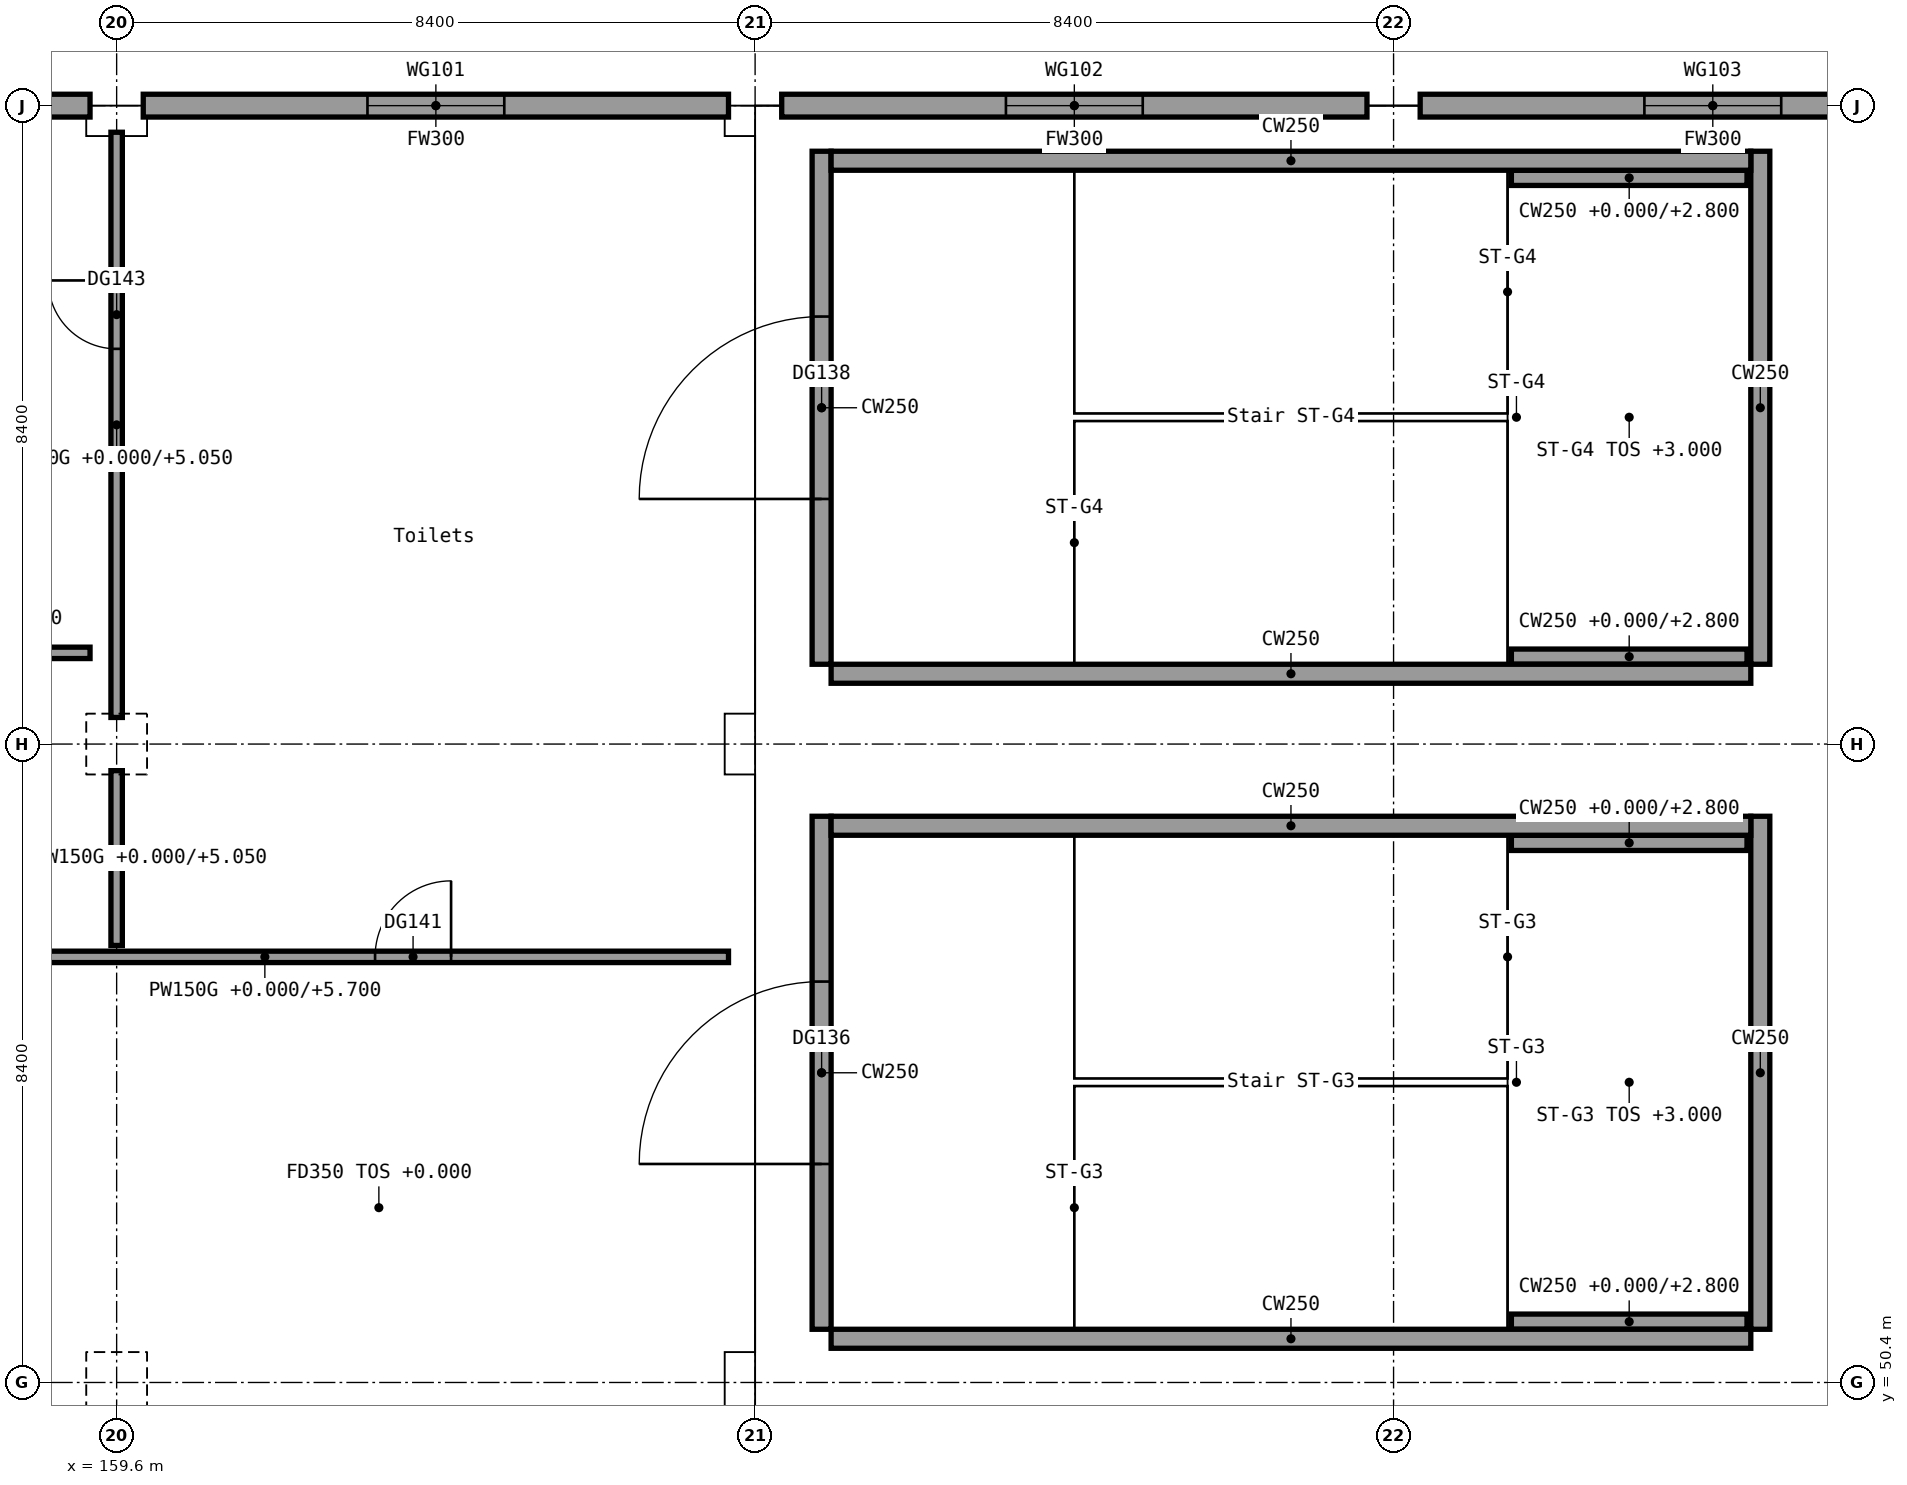
"""IFC4 building model, lengths in metres.
Left out: names, types, materials, properties, quantities, classifications, styles, units other than length and angle.
Written with IfcOpenShell. Run it as: python <this file> out.ifc"""

import sys

from ifc_helpers import new_model, si_unit, direction, frame, frame_2d, origin, origin_2d, place, context, subcontext, project, spatial, rectangle, extrude, element, fill, save


model = new_model("IFC4")
c1 = context("Model", 3, precision=1e-05, world=origin(), true_north=direction((0.0, 1.0)))
c2 = subcontext(c1, "Body", "Model", "MODEL_VIEW")
j1 = project(units=[si_unit("LENGTHUNIT", "METRE"), si_unit("PLANEANGLEUNIT", "RADIAN")], contexts=[c1])
p1 = place(None, origin())
s1 = spatial("IfcSite", under=j1, at=p1, CompositionType="ELEMENT")
p2 = place(p1, origin())
s2 = spatial("IfcBuilding", under=s1, at=p2, CompositionType="ELEMENT")
p3 = place(p2, origin())
s3 = spatial("IfcBuildingStorey", under=s2, at=p3, CompositionType="ELEMENT", Elevation=0.0)
p4 = place(p3, frame((193.886, 58.008, 0.0), z_axis=(0.0, 0.0, 1.0), x_axis=(-0.642781866374, -0.766049262293, 0.0)))
e1 = element("IfcWall", 1, at=p4, inside=s3, PredefinedType="SHEAR", context=c2, shape_type="SweptSolid", body=[
    extrude(rectangle(XDim=38.95, YDim=0.4, at=frame_2d((19.475, 0.0))), origin(), (0.0, 0.0, 1.0), 6.0),
])
p5 = place(p4, frame((13.7, 0.0, 0.0)))
e2 = element("IfcOpeningElement", 2, at=p5, cuts=e1, PredefinedType="OPENING", context=c2, shape_type="SweptSolid", body=[
    extrude(rectangle(XDim=2.4, YDim=2.4, at=frame_2d((1.2, 1.2))), frame((0.0, 0.2, 0.0), z_axis=(0.0, -1.0, 0.0), x_axis=(1.0, 0.0, 0.0)), (0.0, 0.0, 1.0), 0.4),
])
p6 = place(p4, frame((17.2, 0.0, 0.0)))
e3 = element("IfcOpeningElement", 3, at=p6, cuts=e1, PredefinedType="OPENING", context=c2, shape_type="SweptSolid", body=[
    extrude(rectangle(XDim=2.4, YDim=2.4, at=frame_2d((1.2, 1.2))), frame((0.0, 0.2, 0.0), z_axis=(0.0, -1.0, 0.0), x_axis=(1.0, 0.0, 0.0)), (0.0, 0.0, 1.0), 0.4),
])
p7 = place(p4, frame((34.9, 0.0, 0.0)))
e4 = element("IfcOpeningElement", 4, at=p7, cuts=e1, PredefinedType="OPENING", context=c2, shape_type="SweptSolid", body=[
    extrude(rectangle(XDim=1.8, YDim=2.4, at=frame_2d((0.9, 1.2))), frame((0.0, 0.2, 0.0), z_axis=(0.0, -1.0, 0.0), x_axis=(1.0, 0.0, 0.0)), (0.0, 0.0, 1.0), 0.4),
])
for number, where, z_axis, x_axis in (
    (5, (159.6, 50.4, 0.0), (0.0, 0.0, 1.0), (1.0, 0.0, 0.0)),
    (6, (159.6, 58.8, 0.0), (0.0, 0.0, 1.0), (1.0, 0.0, 0.0)),
    (7, (159.6, 67.2, 0.0), (0.0, 0.0, 1.0), (1.0, 0.0, 0.0)),
    (8, (168.0, 50.4, 0.0), (0.0, 0.0, 1.0), (1.0, 0.0, 0.0)),
    (9, (168.0, 58.8, 0.0), (0.0, 0.0, 1.0), (1.0, 0.0, 0.0)),
    (10, (168.0, 67.2, 0.0), (0.0, 0.0, 1.0), (1.0, 0.0, 0.0)),
    (11, (176.4, 50.4, 0.0), (0.0, 0.0, 1.0), (1.0, 0.0, 0.0)),
    (12, (176.4, 58.8, 0.0), (0.0, 0.0, 1.0), (1.0, 0.0, 0.0)),
    (13, (176.4, 67.2, 0.0), (0.0, 0.0, 1.0), (1.0, 0.0, 0.0)),
):
    element("IfcColumn", number, at=place(p3, frame(where, z_axis=z_axis, x_axis=x_axis)), inside=s3, PredefinedType="COLUMN", context=c2, shape_type="SweptSolid", body=[
        extrude(rectangle(XDim=0.7, YDim=0.7, at=origin_2d()), origin(), (0.0, 0.0, 1.0), 6.0),
    ])
p8 = place(p3, frame((151.55, 67.2, 0.0), z_axis=(0.0, 0.0, 1.0), x_axis=(1.0, 0.0, 0.0)))
e14 = element("IfcWall", 14, at=p8, inside=s3, PredefinedType="STANDARD", context=c2, shape_type="SweptSolid", body=[
    extrude(rectangle(XDim=7.7, YDim=0.3, at=frame_2d((3.85, 0.0))), origin(), (0.0, 0.0, 1.0), 6.0),
])
p9 = place(p3, frame((159.95, 67.2, 0.0), z_axis=(0.0, 0.0, 1.0), x_axis=(1.0, 0.0, 0.0)))
e15 = element("IfcWall", 15, at=p9, inside=s3, PredefinedType="STANDARD", context=c2, shape_type="SweptSolid", body=[
    extrude(rectangle(XDim=7.7, YDim=0.3, at=frame_2d((3.85, 0.0))), origin(), (0.0, 0.0, 1.0), 6.0),
])
p10 = place(p9, frame((2.95, 0.0, 0.9)))
e16 = element("IfcOpeningElement", 16, at=p10, cuts=e15, PredefinedType="OPENING", context=c2, shape_type="SweptSolid", body=[
    extrude(rectangle(XDim=1.8, YDim=1.5, at=frame_2d((0.9, 0.75))), frame((0.0, 0.15, 0.0), z_axis=(0.0, -1.0, 0.0), x_axis=(1.0, 0.0, 0.0)), (0.0, 0.0, 1.0), 0.3),
])
p11 = place(p3, frame((168.35, 67.2, 0.0), z_axis=(0.0, 0.0, 1.0), x_axis=(1.0, 0.0, 0.0)))
e17 = element("IfcWall", 17, at=p11, inside=s3, PredefinedType="STANDARD", context=c2, shape_type="SweptSolid", body=[
    extrude(rectangle(XDim=7.7, YDim=0.3, at=frame_2d((3.85, 0.0))), origin(), (0.0, 0.0, 1.0), 6.0),
])
p12 = place(p11, frame((2.95, 0.0, 0.9)))
e18 = element("IfcOpeningElement", 18, at=p12, cuts=e17, PredefinedType="OPENING", context=c2, shape_type="SweptSolid", body=[
    extrude(rectangle(XDim=1.8, YDim=1.5, at=frame_2d((0.9, 0.75))), frame((0.0, 0.15, 0.0), z_axis=(0.0, -1.0, 0.0), x_axis=(1.0, 0.0, 0.0)), (0.0, 0.0, 1.0), 0.3),
])
p13 = place(p3, frame((176.75, 67.2, 0.0), z_axis=(0.0, 0.0, 1.0), x_axis=(1.0, 0.0, 0.0)))
e19 = element("IfcWall", 19, at=p13, inside=s3, PredefinedType="STANDARD", context=c2, shape_type="SweptSolid", body=[
    extrude(rectangle(XDim=7.7, YDim=0.3, at=frame_2d((3.85, 0.0))), origin(), (0.0, 0.0, 1.0), 6.0),
])
p14 = place(p13, frame((2.95, 0.0, 0.9)))
e20 = element("IfcOpeningElement", 20, at=p14, cuts=e19, PredefinedType="OPENING", context=c2, shape_type="SweptSolid", body=[
    extrude(rectangle(XDim=1.8, YDim=1.5, at=frame_2d((0.9, 0.75))), frame((0.0, 0.15, 0.0), z_axis=(0.0, -1.0, 0.0), x_axis=(1.0, 0.0, 0.0)), (0.0, 0.0, 1.0), 0.3),
])
for number, where, z_axis, x_axis in (
    (21, (177.95, 51.2, 0.0), (0.0, 0.0, 1.0), (1.0, 0.0, 0.0)),
    (22, (181.05, 57.5, 0.0), (0.0, 0.0, 1.0), (-1.0, 0.0, 0.0)),
    (23, (177.95, 59.95, 0.0), (0.0, 0.0, 1.0), (1.0, 0.0, 0.0)),
    (24, (181.05, 66.25, 0.0), (0.0, 0.0, 1.0), (-1.0, 0.0, 0.0)),
):
    element("IfcWall", number, at=place(p3, frame(where, z_axis=z_axis, x_axis=x_axis)), inside=s3, PredefinedType="SHEAR", context=c2, shape_type="SweptSolid", body=[
        extrude(rectangle(XDim=3.1, YDim=0.2, at=frame_2d((1.55, 0.0))), origin(), (0.0, 0.0, 1.0), 2.8),
    ])
p15 = place(p3, frame((168.875, 51.1, 0.0), z_axis=(0.0, 0.0, 1.0), x_axis=(0.0, 1.0, 0.0)))
e25 = element("IfcWall", 25, at=p15, inside=s3, PredefinedType="SHEAR", context=c2, shape_type="SweptSolid", body=[
    extrude(rectangle(XDim=6.75, YDim=0.25, at=frame_2d((3.375, 0.0))), origin(), (0.0, 0.0, 1.0), 6.0),
])
p16 = place(p15, frame((2.175, 0.0, 0.0)))
e26 = element("IfcOpeningElement", 26, at=p16, cuts=e25, PredefinedType="OPENING", context=c2, shape_type="SweptSolid", body=[
    extrude(rectangle(XDim=2.4, YDim=2.1, at=frame_2d((1.2, 1.05))), frame((0.0, 0.125, 0.0), z_axis=(0.0, -1.0, 0.0), x_axis=(1.0, 0.0, 0.0)), (0.0, 0.0, 1.0), 0.25),
])
p17 = place(p3, frame((181.225, 51.1, 0.0), z_axis=(0.0, 0.0, 1.0), x_axis=(0.0, 1.0, 0.0)))
e27 = element("IfcWall", 27, at=p17, inside=s3, PredefinedType="SHEAR", context=c2, shape_type="SweptSolid", body=[
    extrude(rectangle(XDim=6.75, YDim=0.25, at=frame_2d((3.375, 0.0))), origin(), (0.0, 0.0, 1.0), 6.0),
])
for number, where, z_axis, x_axis in (
    (28, (169.0, 57.725, 0.0), (0.0, 0.0, 1.0), (1.0, 0.0, 0.0)),
    (29, (169.0, 50.975, 0.0), (0.0, 0.0, 1.0), (1.0, 0.0, 0.0)),
):
    element("IfcWall", number, at=place(p3, frame(where, z_axis=z_axis, x_axis=x_axis)), inside=s3, PredefinedType="SHEAR", context=c2, shape_type="SweptSolid", body=[
        extrude(rectangle(XDim=12.1, YDim=0.25, at=frame_2d((6.05, 0.0))), origin(), (0.0, 0.0, 1.0), 6.0),
    ])
p18 = place(p3, frame((168.875, 59.85, 0.0), z_axis=(0.0, 0.0, 1.0), x_axis=(0.0, 1.0, 0.0)))
e30 = element("IfcWall", 30, at=p18, inside=s3, PredefinedType="SHEAR", context=c2, shape_type="SweptSolid", body=[
    extrude(rectangle(XDim=6.75, YDim=0.25, at=frame_2d((3.375, 0.0))), origin(), (0.0, 0.0, 1.0), 6.0),
])
p19 = place(p18, frame((2.175, 0.0, 0.0)))
e31 = element("IfcOpeningElement", 31, at=p19, cuts=e30, PredefinedType="OPENING", context=c2, shape_type="SweptSolid", body=[
    extrude(rectangle(XDim=2.4, YDim=2.1, at=frame_2d((1.2, 1.05))), frame((0.0, 0.125, 0.0), z_axis=(0.0, -1.0, 0.0), x_axis=(1.0, 0.0, 0.0)), (0.0, 0.0, 1.0), 0.25),
])
p20 = place(p3, frame((181.225, 59.85, 0.0), z_axis=(0.0, 0.0, 1.0), x_axis=(0.0, 1.0, 0.0)))
e32 = element("IfcWall", 32, at=p20, inside=s3, PredefinedType="SHEAR", context=c2, shape_type="SweptSolid", body=[
    extrude(rectangle(XDim=6.75, YDim=0.25, at=frame_2d((3.375, 0.0))), origin(), (0.0, 0.0, 1.0), 6.0),
])
for number, where, z_axis, x_axis in (
    (33, (169.0, 66.475, 0.0), (0.0, 0.0, 1.0), (1.0, 0.0, 0.0)),
    (34, (169.0, 59.725, 0.0), (0.0, 0.0, 1.0), (1.0, 0.0, 0.0)),
):
    element("IfcWall", number, at=place(p3, frame(where, z_axis=z_axis, x_axis=x_axis)), inside=s3, PredefinedType="SHEAR", context=c2, shape_type="SweptSolid", body=[
        extrude(rectangle(XDim=12.1, YDim=0.25, at=frame_2d((6.05, 0.0))), origin(), (0.0, 0.0, 1.0), 6.0),
    ])
p21 = place(p3, frame((155.45, 56.0, 0.0), z_axis=(0.0, 0.0, 1.0), x_axis=(1.0, 0.0, 0.0)))
e35 = element("IfcWall", 35, at=p21, inside=s3, PredefinedType="PARTITIONING", context=c2, shape_type="SweptSolid", body=[
    extrude(rectangle(XDim=12.2, YDim=0.15, at=frame_2d((6.1, 0.0))), origin(), (0.0, 0.0, 1.0), 5.7),
])
p22 = place(p21, frame((7.55, 0.0, 0.0)))
e36 = element("IfcOpeningElement", 36, at=p22, cuts=e35, PredefinedType="OPENING", context=c2, shape_type="SweptSolid", body=[
    extrude(rectangle(XDim=1.0, YDim=2.1, at=frame_2d((0.5, 1.05))), frame((0.0, 0.075, 0.0), z_axis=(0.0, -1.0, 0.0), x_axis=(1.0, 0.0, 0.0)), (0.0, 0.0, 1.0), 0.15),
])
p23 = place(p21, frame((1.45, 0.0, 0.0)))
e37 = element("IfcOpeningElement", 37, at=p23, cuts=e35, PredefinedType="OPENING", context=c2, shape_type="SweptSolid", body=[
    extrude(rectangle(XDim=1.0, YDim=2.1, at=frame_2d((0.5, 1.05))), frame((0.0, 0.075, 0.0), z_axis=(0.0, -1.0, 0.0), x_axis=(1.0, 0.0, 0.0)), (0.0, 0.0, 1.0), 0.15),
])
p24 = place(p3, frame((159.6, 56.15, 0.0), z_axis=(0.0, 0.0, 1.0), x_axis=(0.0, 1.0, 0.0)))
e38 = element("IfcWall", 38, at=p24, inside=s3, PredefinedType="PARTITIONING", context=c2, shape_type="SweptSolid", body=[
    extrude(rectangle(XDim=2.3, YDim=0.15, at=frame_2d((1.15, 0.0))), origin(), (0.0, 0.0, 1.0), 5.05),
])
p25 = place(p3, frame((159.6, 59.15, 0.0), z_axis=(0.0, 0.0, 1.0), x_axis=(0.0, 1.0, 0.0)))
e39 = element("IfcWall", 39, at=p25, inside=s3, PredefinedType="PARTITIONING", context=c2, shape_type="SweptSolid", body=[
    extrude(rectangle(XDim=7.7, YDim=0.15, at=frame_2d((3.85, 0.0))), origin(), (0.0, 0.0, 1.0), 5.05),
])
p26 = place(p25, frame((4.85, 0.0, 0.0)))
e40 = element("IfcOpeningElement", 40, at=p26, cuts=e39, PredefinedType="OPENING", context=c2, shape_type="SweptSolid", body=[
    extrude(rectangle(XDim=0.9, YDim=2.1, at=frame_2d((0.45, 1.05))), frame((0.0, 0.075, 0.0), z_axis=(0.0, -1.0, 0.0), x_axis=(1.0, 0.0, 0.0)), (0.0, 0.0, 1.0), 0.15),
])
p27 = place(p3, frame((155.45, 60.0, 0.0), z_axis=(0.0, 0.0, 1.0), x_axis=(1.0, 0.0, 0.0)))
e41 = element("IfcWall", 41, at=p27, inside=s3, PredefinedType="PARTITIONING", context=c2, shape_type="SweptSolid", body=[
    extrude(rectangle(XDim=3.8, YDim=0.15, at=frame_2d((1.9, 0.0))), origin(), (0.0, 0.0, 1.0), 5.7),
])
p28 = place(p16, origin())
e42 = element("IfcDoor", 42, at=p28, inside=s3, OperationType="DOUBLE_DOOR_SINGLE_SWING", PredefinedType="DOOR", context=c2, shape_type="SweptSolid", body=[
    extrude(rectangle(XDim=2.4, YDim=2.1, at=frame_2d((1.2, 1.05))), frame((0.0, 0.025, 0.0), z_axis=(0.0, -1.0, 0.0), x_axis=(1.0, 0.0, 0.0)), (0.0, 0.0, 1.0), 0.05),
])
fill(e26, e42)
p29 = place(p19, origin())
e43 = element("IfcDoor", 43, at=p29, inside=s3, OperationType="DOUBLE_DOOR_SINGLE_SWING", PredefinedType="DOOR", context=c2, shape_type="SweptSolid", body=[
    extrude(rectangle(XDim=2.4, YDim=2.1, at=frame_2d((1.2, 1.05))), frame((0.0, 0.025, 0.0), z_axis=(0.0, -1.0, 0.0), x_axis=(1.0, 0.0, 0.0)), (0.0, 0.0, 1.0), 0.05),
])
fill(e31, e43)
p30 = place(p22, origin())
e44 = element("IfcDoor", 44, at=p30, inside=s3, OperationType="SINGLE_SWING_RIGHT", PredefinedType="DOOR", context=c2, shape_type="SweptSolid", body=[
    extrude(rectangle(XDim=1.0, YDim=2.1, at=frame_2d((0.5, 1.05))), frame((0.0, 0.025, 0.0), z_axis=(0.0, -1.0, 0.0), x_axis=(1.0, 0.0, 0.0)), (0.0, 0.0, 1.0), 0.05),
])
fill(e36, e44)
p31 = place(p26, origin())
e45 = element("IfcDoor", 45, at=p31, inside=s3, OperationType="SINGLE_SWING_RIGHT", PredefinedType="DOOR", context=c2, shape_type="SweptSolid", body=[
    extrude(rectangle(XDim=0.9, YDim=2.1, at=frame_2d((0.45, 1.05))), frame((0.0, 0.025, 0.0), z_axis=(0.0, -1.0, 0.0), x_axis=(1.0, 0.0, 0.0)), (0.0, 0.0, 1.0), 0.05),
])
fill(e40, e45)
p32 = place(p10, origin())
e46 = element("IfcWindow", 46, at=p32, inside=s3, PartitioningType="SINGLE_PANEL", PredefinedType="WINDOW", context=c2, shape_type="SweptSolid", body=[
    extrude(rectangle(XDim=1.8, YDim=1.5, at=frame_2d((0.9, 0.75))), frame((0.0, 0.03, 0.0), z_axis=(0.0, -1.0, 0.0), x_axis=(1.0, 0.0, 0.0)), (0.0, 0.0, 1.0), 0.06),
])
fill(e16, e46)
p33 = place(p12, origin())
e47 = element("IfcWindow", 47, at=p33, inside=s3, PartitioningType="SINGLE_PANEL", PredefinedType="WINDOW", context=c2, shape_type="SweptSolid", body=[
    extrude(rectangle(XDim=1.8, YDim=1.5, at=frame_2d((0.9, 0.75))), frame((0.0, 0.03, 0.0), z_axis=(0.0, -1.0, 0.0), x_axis=(1.0, 0.0, 0.0)), (0.0, 0.0, 1.0), 0.06),
])
fill(e18, e47)
p34 = place(p14, origin())
e48 = element("IfcWindow", 48, at=p34, inside=s3, PartitioningType="SINGLE_PANEL", PredefinedType="WINDOW", context=c2, shape_type="SweptSolid", body=[
    extrude(rectangle(XDim=1.8, YDim=1.5, at=frame_2d((0.9, 0.75))), frame((0.0, 0.03, 0.0), z_axis=(0.0, -1.0, 0.0), x_axis=(1.0, 0.0, 0.0)), (0.0, 0.0, 1.0), 0.06),
])
fill(e20, e48)
save(model, sys.argv[1])
